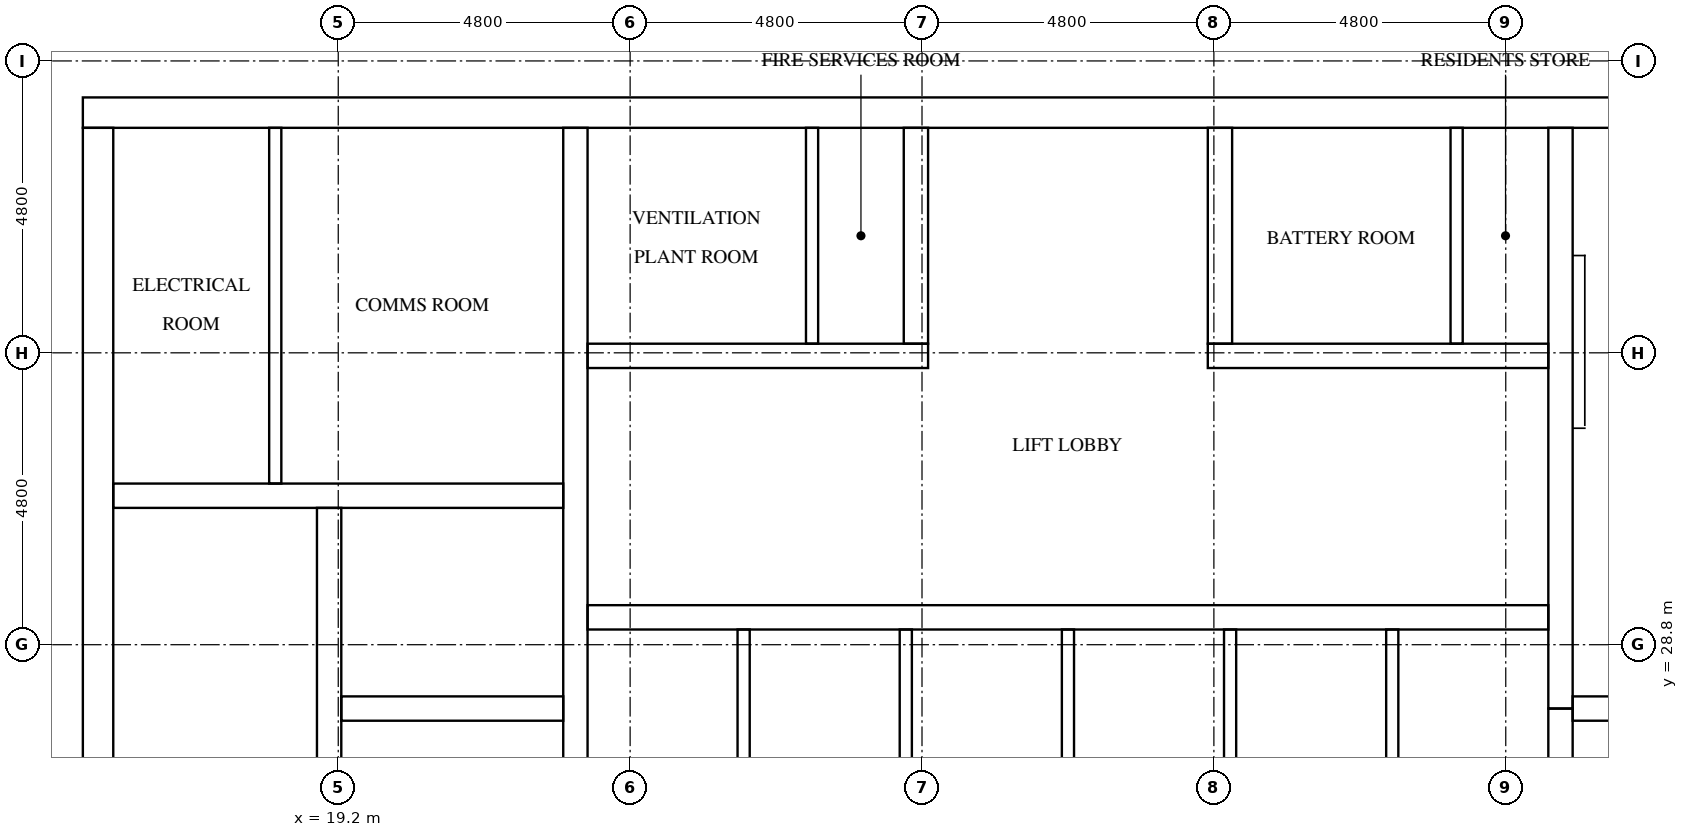
"""IFC4 building model, lengths in metres.
Left out: names, types, materials, properties, quantities, classifications, styles, units other than length and angle.
Written with IfcOpenShell. Run it as: python <this file> out.ifc"""

import sys

from ifc_helpers import new_model, si_unit, direction, frame, frame_2d, origin, place, context, subcontext, project, spatial, rectangle, extrude, element, fill, save


model = new_model("IFC4")
c1 = context("Model", 3, precision=1e-05, world=origin(), true_north=direction((0.0, 1.0)))
c2 = subcontext(c1, "Body", "Model", "MODEL_VIEW")
j1 = project(units=[si_unit("LENGTHUNIT", "METRE"), si_unit("PLANEANGLEUNIT", "RADIAN")], contexts=[c1])
p1 = place(None, origin())
s1 = spatial("IfcSite", under=j1, at=p1, CompositionType="ELEMENT")
p2 = place(p1, origin())
s2 = spatial("IfcBuilding", under=s1, at=p2, CompositionType="ELEMENT")
p3 = place(p2, frame((0.0, 0.0, 272.1)))
s3 = spatial("IfcBuildingStorey", under=s2, at=p3, CompositionType="ELEMENT", Elevation=272.1)
p4 = place(p3, frame((15.0, 37.55, 0.0), z_axis=(0.0, 0.0, 1.0), x_axis=(1.0, 0.0, 0.0)))
e1 = element("IfcWall", 1, at=p4, inside=s3, PredefinedType="SHEAR", context=c2, shape_type="SweptSolid", body=[
    extrude(rectangle(XDim=32.4, YDim=0.5, at=frame_2d((16.2, 0.0))), origin(), (0.0, 0.0, 1.0), 3.2),
])
p5 = place(p4, frame((15.3, 0.0, 0.0)))
e2 = element("IfcOpeningElement", 2, at=p5, cuts=e1, PredefinedType="OPENING", context=c2, shape_type="SweptSolid", body=[
    extrude(rectangle(XDim=1.8, YDim=2.1, at=frame_2d((0.9, 1.05))), frame((0.0, 0.26, 0.0), z_axis=(0.0, -1.0, 0.0), x_axis=(1.0, 0.0, 0.0)), (0.0, 0.0, 1.0), 0.52),
])
p6 = place(p4, frame((1.282, 0.0, 0.0)))
e3 = element("IfcOpeningElement", 3, at=p6, cuts=e1, PredefinedType="OPENING", context=c2, shape_type="SweptSolid", body=[
    extrude(rectangle(XDim=1.0, YDim=2.1, at=frame_2d((0.5, 1.05))), frame((0.0, 0.26, 0.0), z_axis=(0.0, -1.0, 0.0), x_axis=(1.0, 0.0, 0.0)), (0.0, 0.0, 1.0), 0.52),
])
p7 = place(p4, frame((5.082, 0.0, 0.0)))
e4 = element("IfcOpeningElement", 4, at=p7, cuts=e1, PredefinedType="OPENING", context=c2, shape_type="SweptSolid", body=[
    extrude(rectangle(XDim=1.0, YDim=2.1, at=frame_2d((0.5, 1.05))), frame((0.0, 0.26, 0.0), z_axis=(0.0, -1.0, 0.0), x_axis=(1.0, 0.0, 0.0)), (0.0, 0.0, 1.0), 0.52),
])
p8 = place(p3, frame((15.25, 15.5, 0.0), z_axis=(0.0, 0.0, 1.0), x_axis=(0.0, 1.0, 0.0)))
e5 = element("IfcWall", 5, at=p8, inside=s3, PredefinedType="SHEAR", context=c2, shape_type="SweptSolid", body=[
    extrude(rectangle(XDim=21.8, YDim=0.5, at=frame_2d((10.9, 0.0))), origin(), (0.0, 0.0, 1.0), 3.2),
])
p9 = place(p8, frame((5.26, 0.0, 0.0)))
e6 = element("IfcOpeningElement", 6, at=p9, cuts=e5, PredefinedType="OPENING", context=c2, shape_type="SweptSolid", body=[
    extrude(rectangle(XDim=1.2, YDim=2.1, at=frame_2d((0.6, 1.05))), frame((0.0, 0.26, 0.0), z_axis=(0.0, -1.0, 0.0), x_axis=(1.0, 0.0, 0.0)), (0.0, 0.0, 1.0), 0.52),
])
p10 = place(p3, frame((19.05, 15.5, 0.0), z_axis=(0.0, 0.0, 1.0), x_axis=(0.0, 1.0, 0.0)))
e7 = element("IfcWall", 7, at=p10, inside=s3, PredefinedType="SHEAR", context=c2, shape_type="SweptSolid", body=[
    extrude(rectangle(XDim=15.55, YDim=0.4, at=frame_2d((7.775, 0.0))), origin(), (0.0, 0.0, 1.0), 3.2),
])
p11 = place(p10, frame((9.95, 0.0, 0.0)))
e8 = element("IfcOpeningElement", 8, at=p11, cuts=e7, PredefinedType="OPENING", context=c2, shape_type="SweptSolid", body=[
    extrude(rectangle(XDim=1.1, YDim=2.1, at=frame_2d((0.55, 1.05))), frame((0.0, 0.21, 0.0), z_axis=(0.0, -1.0, 0.0), x_axis=(1.0, 0.0, 0.0)), (0.0, 0.0, 1.0), 0.42),
])
p12 = place(p10, frame((13.45, 0.0, 0.0)))
e9 = element("IfcOpeningElement", 9, at=p12, cuts=e7, PredefinedType="OPENING", context=c2, shape_type="SweptSolid", body=[
    extrude(rectangle(XDim=1.1, YDim=2.1, at=frame_2d((0.55, 1.05))), frame((0.0, 0.21, 0.0), z_axis=(0.0, -1.0, 0.0), x_axis=(1.0, 0.0, 0.0)), (0.0, 0.0, 1.0), 0.42),
])
p13 = place(p10, frame((0.7, 0.0, 0.0)))
e10 = element("IfcOpeningElement", 10, at=p13, cuts=e7, PredefinedType="OPENING", context=c2, shape_type="SweptSolid", body=[
    extrude(rectangle(XDim=1.2, YDim=2.1, at=frame_2d((0.6, 1.05))), frame((0.0, 0.21, 0.0), z_axis=(0.0, -1.0, 0.0), x_axis=(1.0, 0.0, 0.0)), (0.0, 0.0, 1.0), 0.42),
])
p14 = place(p3, frame((23.1, 15.5, 0.0), z_axis=(0.0, 0.0, 1.0), x_axis=(0.0, 1.0, 0.0)))
e11 = element("IfcWall", 11, at=p14, inside=s3, PredefinedType="SHEAR", context=c2, shape_type="SweptSolid", body=[
    extrude(rectangle(XDim=21.8, YDim=0.4, at=frame_2d((10.9, 0.0))), origin(), (0.0, 0.0, 1.0), 3.2),
])
p15 = place(p3, frame((39.3, 24.25, 0.0), z_axis=(0.0, 0.0, 1.0), x_axis=(0.0, 1.0, 0.0)))
e12 = element("IfcWall", 12, at=p15, inside=s3, PredefinedType="SHEAR", context=c2, shape_type="SweptSolid", body=[
    extrude(rectangle(XDim=3.5, YDim=0.4, at=frame_2d((1.75, 0.0))), origin(), (0.0, 0.0, 1.0), 3.2),
])
p16 = place(p3, frame((39.3, 27.75, 0.0), z_axis=(0.0, 0.0, 1.0), x_axis=(0.0, 1.0, 0.0)))
e13 = element("IfcWall", 13, at=p16, inside=s3, PredefinedType="SHEAR", context=c2, shape_type="SweptSolid", body=[
    extrude(rectangle(XDim=9.55, YDim=0.4, at=frame_2d((4.775, 0.0))), origin(), (0.0, 0.0, 1.0), 3.2),
])
p17 = place(p3, frame((19.25, 27.75, 0.0), z_axis=(0.0, 0.0, 1.0), x_axis=(1.0, 0.0, 0.0)))
e14 = element("IfcWall", 14, at=p17, inside=s3, PredefinedType="SHEAR", context=c2, shape_type="SweptSolid", body=[
    extrude(rectangle(XDim=3.65, YDim=0.4, at=frame_2d((1.825, 0.0))), origin(), (0.0, 0.0, 1.0), 3.2),
])
p18 = place(p3, frame((15.5, 31.25, 0.0), z_axis=(0.0, 0.0, 1.0), x_axis=(1.0, 0.0, 0.0)))
e15 = element("IfcWall", 15, at=p18, inside=s3, PredefinedType="SHEAR", context=c2, shape_type="SweptSolid", body=[
    extrude(rectangle(XDim=7.4, YDim=0.4, at=frame_2d((3.7, 0.0))), origin(), (0.0, 0.0, 1.0), 3.2),
])
p19 = place(p3, frame((39.5, 27.75, 0.0), z_axis=(0.0, 0.0, 1.0), x_axis=(1.0, 0.0, 0.0)))
e16 = element("IfcWall", 16, at=p19, inside=s3, PredefinedType="SHEAR", context=c2, shape_type="SweptSolid", body=[
    extrude(rectangle(XDim=3.65, YDim=0.4, at=frame_2d((1.825, 0.0))), origin(), (0.0, 0.0, 1.0), 3.2),
])
p20 = place(p3, frame((23.3, 29.25, 0.0), z_axis=(0.0, 0.0, 1.0), x_axis=(1.0, 0.0, 0.0)))
e17 = element("IfcWall", 17, at=p20, inside=s3, PredefinedType="SHEAR", context=c2, shape_type="SweptSolid", body=[
    extrude(rectangle(XDim=15.8, YDim=0.4, at=frame_2d((7.9, 0.0))), origin(), (0.0, 0.0, 1.0), 3.2),
])
p21 = place(p20, frame((0.683, 0.0, 0.0)))
e18 = element("IfcOpeningElement", 18, at=p21, cuts=e17, PredefinedType="OPENING", context=c2, shape_type="SweptSolid", body=[
    extrude(rectangle(XDim=1.1, YDim=2.1, at=frame_2d((0.55, 1.05))), frame((0.0, 0.21, 0.0), z_axis=(0.0, -1.0, 0.0), x_axis=(1.0, 0.0, 0.0)), (0.0, 0.0, 1.0), 0.42),
])
p22 = place(p20, frame((3.35, 0.0, 0.0)))
e19 = element("IfcOpeningElement", 19, at=p22, cuts=e17, PredefinedType="OPENING", context=c2, shape_type="SweptSolid", body=[
    extrude(rectangle(XDim=1.1, YDim=2.1, at=frame_2d((0.55, 1.05))), frame((0.0, 0.21, 0.0), z_axis=(0.0, -1.0, 0.0), x_axis=(1.0, 0.0, 0.0)), (0.0, 0.0, 1.0), 0.42),
])
p23 = place(p20, frame((6.017, 0.0, 0.0)))
e20 = element("IfcOpeningElement", 20, at=p23, cuts=e17, PredefinedType="OPENING", context=c2, shape_type="SweptSolid", body=[
    extrude(rectangle(XDim=1.1, YDim=2.1, at=frame_2d((0.55, 1.05))), frame((0.0, 0.21, 0.0), z_axis=(0.0, -1.0, 0.0), x_axis=(1.0, 0.0, 0.0)), (0.0, 0.0, 1.0), 0.42),
])
p24 = place(p20, frame((8.683, 0.0, 0.0)))
e21 = element("IfcOpeningElement", 21, at=p24, cuts=e17, PredefinedType="OPENING", context=c2, shape_type="SweptSolid", body=[
    extrude(rectangle(XDim=1.1, YDim=2.1, at=frame_2d((0.55, 1.05))), frame((0.0, 0.21, 0.0), z_axis=(0.0, -1.0, 0.0), x_axis=(1.0, 0.0, 0.0)), (0.0, 0.0, 1.0), 0.42),
])
p25 = place(p20, frame((11.35, 0.0, 0.0)))
e22 = element("IfcOpeningElement", 22, at=p25, cuts=e17, PredefinedType="OPENING", context=c2, shape_type="SweptSolid", body=[
    extrude(rectangle(XDim=1.1, YDim=2.1, at=frame_2d((0.55, 1.05))), frame((0.0, 0.21, 0.0), z_axis=(0.0, -1.0, 0.0), x_axis=(1.0, 0.0, 0.0)), (0.0, 0.0, 1.0), 0.42),
])
p26 = place(p20, frame((14.017, 0.0, 0.0)))
e23 = element("IfcOpeningElement", 23, at=p26, cuts=e17, PredefinedType="OPENING", context=c2, shape_type="SweptSolid", body=[
    extrude(rectangle(XDim=1.1, YDim=2.1, at=frame_2d((0.55, 1.05))), frame((0.0, 0.21, 0.0), z_axis=(0.0, -1.0, 0.0), x_axis=(1.0, 0.0, 0.0)), (0.0, 0.0, 1.0), 0.42),
])
p27 = place(p3, frame((23.3, 33.55, 0.0), z_axis=(0.0, 0.0, 1.0), x_axis=(1.0, 0.0, 0.0)))
e24 = element("IfcWall", 24, at=p27, inside=s3, PredefinedType="SHEAR", context=c2, shape_type="SweptSolid", body=[
    extrude(rectangle(XDim=5.6, YDim=0.4, at=frame_2d((2.8, 0.0))), origin(), (0.0, 0.0, 1.0), 3.2),
])
p28 = place(p27, frame((1.296, 0.0, 0.0)))
e25 = element("IfcOpeningElement", 25, at=p28, cuts=e24, PredefinedType="OPENING", context=c2, shape_type="SweptSolid", body=[
    extrude(rectangle(XDim=1.0, YDim=2.1, at=frame_2d((0.5, 1.05))), frame((0.0, 0.21, 0.0), z_axis=(0.0, -1.0, 0.0), x_axis=(1.0, 0.0, 0.0)), (0.0, 0.0, 1.0), 0.42),
])
p29 = place(p27, frame((3.996, 0.0, 0.0)))
e26 = element("IfcOpeningElement", 26, at=p29, cuts=e24, PredefinedType="OPENING", context=c2, shape_type="SweptSolid", body=[
    extrude(rectangle(XDim=1.0, YDim=2.1, at=frame_2d((0.5, 1.05))), frame((0.0, 0.21, 0.0), z_axis=(0.0, -1.0, 0.0), x_axis=(1.0, 0.0, 0.0)), (0.0, 0.0, 1.0), 0.42),
])
p30 = place(p3, frame((33.5, 33.55, 0.0), z_axis=(0.0, 0.0, 1.0), x_axis=(1.0, 0.0, 0.0)))
e27 = element("IfcWall", 27, at=p30, inside=s3, PredefinedType="SHEAR", context=c2, shape_type="SweptSolid", body=[
    extrude(rectangle(XDim=5.6, YDim=0.4, at=frame_2d((2.8, 0.0))), origin(), (0.0, 0.0, 1.0), 3.2),
])
p31 = place(p30, frame((1.696, 0.0, 0.0)))
e28 = element("IfcOpeningElement", 28, at=p31, cuts=e27, PredefinedType="OPENING", context=c2, shape_type="SweptSolid", body=[
    extrude(rectangle(XDim=1.0, YDim=2.1, at=frame_2d((0.5, 1.05))), frame((0.0, 0.21, 0.0), z_axis=(0.0, -1.0, 0.0), x_axis=(1.0, 0.0, 0.0)), (0.0, 0.0, 1.0), 0.42),
])
p32 = place(p30, frame((4.396, 0.0, 0.0)))
e29 = element("IfcOpeningElement", 29, at=p32, cuts=e27, PredefinedType="OPENING", context=c2, shape_type="SweptSolid", body=[
    extrude(rectangle(XDim=1.0, YDim=2.1, at=frame_2d((0.5, 1.05))), frame((0.0, 0.21, 0.0), z_axis=(0.0, -1.0, 0.0), x_axis=(1.0, 0.0, 0.0)), (0.0, 0.0, 1.0), 0.42),
])
for number, where, z_axis, x_axis in (
    (30, (28.7, 33.75, 0.0), (0.0, 0.0, 1.0), (0.0, 1.0, 0.0)),
    (31, (33.7, 33.75, 0.0), (0.0, 0.0, 1.0), (0.0, 1.0, 0.0)),
):
    element("IfcWall", number, at=place(p3, frame(where, z_axis=z_axis, x_axis=x_axis)), inside=s3, PredefinedType="SHEAR", context=c2, shape_type="SweptSolid", body=[
        extrude(rectangle(XDim=3.55, YDim=0.4, at=frame_2d((1.775, 0.0))), origin(), (0.0, 0.0, 1.0), 3.2),
    ])
for number, where, z_axis, x_axis in (
    (32, (25.867, 26.35, 0.0), (0.0, 0.0, 1.0), (0.0, 1.0, 0.0)),
    (33, (28.533, 26.35, 0.0), (0.0, 0.0, 1.0), (0.0, 1.0, 0.0)),
    (34, (31.2, 26.35, 0.0), (0.0, 0.0, 1.0), (0.0, 1.0, 0.0)),
    (35, (33.867, 26.35, 0.0), (0.0, 0.0, 1.0), (0.0, 1.0, 0.0)),
    (36, (36.533, 26.35, 0.0), (0.0, 0.0, 1.0), (0.0, 1.0, 0.0)),
):
    element("IfcWall", number, at=place(p3, frame(where, z_axis=z_axis, x_axis=x_axis)), inside=s3, PredefinedType="SOLIDWALL", context=c2, shape_type="SweptSolid", body=[
        extrude(rectangle(XDim=2.7, YDim=0.2, at=frame_2d((1.35, 0.0))), origin(), (0.0, 0.0, 1.0), 3.2),
    ])
p33 = place(p3, frame((18.164, 31.45, 0.0), z_axis=(0.0, 0.0, 1.0), x_axis=(0.0, 1.0, 0.0)))
e37 = element("IfcWall", 37, at=p33, inside=s3, PredefinedType="PARTITIONING", context=c2, shape_type="SweptSolid", body=[
    extrude(rectangle(XDim=5.85, YDim=0.2, at=frame_2d((2.925, 0.0))), origin(), (0.0, 0.0, 1.0), 3.2),
])
for number, where, z_axis, x_axis in (
    (38, (26.992, 33.75, 0.0), (0.0, 0.0, 1.0), (0.0, 1.0, 0.0)),
    (39, (37.592, 33.75, 0.0), (0.0, 0.0, 1.0), (0.0, 1.0, 0.0)),
):
    element("IfcWall", number, at=place(p3, frame(where, z_axis=z_axis, x_axis=x_axis)), inside=s3, PredefinedType="PARTITIONING", context=c2, shape_type="SweptSolid", body=[
        extrude(rectangle(XDim=3.55, YDim=0.2, at=frame_2d((1.775, 0.0))), origin(), (0.0, 0.0, 1.0), 3.2),
    ])
p34 = place(p21, origin())
e40 = element("IfcDoor", 40, at=p34, inside=s3, OperationType="DOUBLE_DOOR_SLIDING", PredefinedType="DOOR", context=c2, shape_type="SweptSolid", body=[
    extrude(rectangle(XDim=1.1, YDim=2.1, at=frame_2d((0.55, 1.05))), frame((0.0, 0.025, 0.0), z_axis=(0.0, -1.0, 0.0), x_axis=(1.0, 0.0, 0.0)), (0.0, 0.0, 1.0), 0.05),
])
fill(e18, e40)
p35 = place(p22, origin())
e41 = element("IfcDoor", 41, at=p35, inside=s3, OperationType="DOUBLE_DOOR_SLIDING", PredefinedType="DOOR", context=c2, shape_type="SweptSolid", body=[
    extrude(rectangle(XDim=1.1, YDim=2.1, at=frame_2d((0.55, 1.05))), frame((0.0, 0.025, 0.0), z_axis=(0.0, -1.0, 0.0), x_axis=(1.0, 0.0, 0.0)), (0.0, 0.0, 1.0), 0.05),
])
fill(e19, e41)
p36 = place(p23, origin())
e42 = element("IfcDoor", 42, at=p36, inside=s3, OperationType="DOUBLE_DOOR_SLIDING", PredefinedType="DOOR", context=c2, shape_type="SweptSolid", body=[
    extrude(rectangle(XDim=1.1, YDim=2.1, at=frame_2d((0.55, 1.05))), frame((0.0, 0.025, 0.0), z_axis=(0.0, -1.0, 0.0), x_axis=(1.0, 0.0, 0.0)), (0.0, 0.0, 1.0), 0.05),
])
fill(e20, e42)
p37 = place(p24, origin())
e43 = element("IfcDoor", 43, at=p37, inside=s3, OperationType="DOUBLE_DOOR_SLIDING", PredefinedType="DOOR", context=c2, shape_type="SweptSolid", body=[
    extrude(rectangle(XDim=1.1, YDim=2.1, at=frame_2d((0.55, 1.05))), frame((0.0, 0.025, 0.0), z_axis=(0.0, -1.0, 0.0), x_axis=(1.0, 0.0, 0.0)), (0.0, 0.0, 1.0), 0.05),
])
fill(e21, e43)
p38 = place(p25, origin())
e44 = element("IfcDoor", 44, at=p38, inside=s3, OperationType="DOUBLE_DOOR_SLIDING", PredefinedType="DOOR", context=c2, shape_type="SweptSolid", body=[
    extrude(rectangle(XDim=1.1, YDim=2.1, at=frame_2d((0.55, 1.05))), frame((0.0, 0.025, 0.0), z_axis=(0.0, -1.0, 0.0), x_axis=(1.0, 0.0, 0.0)), (0.0, 0.0, 1.0), 0.05),
])
fill(e22, e44)
p39 = place(p26, origin())
e45 = element("IfcDoor", 45, at=p39, inside=s3, OperationType="DOUBLE_DOOR_SLIDING", PredefinedType="DOOR", context=c2, shape_type="SweptSolid", body=[
    extrude(rectangle(XDim=1.1, YDim=2.1, at=frame_2d((0.55, 1.05))), frame((0.0, 0.025, 0.0), z_axis=(0.0, -1.0, 0.0), x_axis=(1.0, 0.0, 0.0)), (0.0, 0.0, 1.0), 0.05),
])
fill(e23, e45)
p40 = place(p12, origin())
e46 = element("IfcDoor", 46, at=p40, inside=s3, OperationType="DOUBLE_DOOR_SLIDING", PredefinedType="DOOR", context=c2, shape_type="SweptSolid", body=[
    extrude(rectangle(XDim=1.1, YDim=2.1, at=frame_2d((0.55, 1.05))), frame((0.0, 0.025, 0.0), z_axis=(0.0, -1.0, 0.0), x_axis=(1.0, 0.0, 0.0)), (0.0, 0.0, 1.0), 0.05),
])
fill(e9, e46)
p41 = place(p5, origin())
e47 = element("IfcDoor", 47, at=p41, inside=s3, OperationType="DOUBLE_DOOR_SINGLE_SWING", PredefinedType="DOOR", context=c2, shape_type="SweptSolid", body=[
    extrude(rectangle(XDim=1.8, YDim=2.1, at=frame_2d((0.9, 1.05))), frame((0.0, 0.025, 0.0), z_axis=(0.0, -1.0, 0.0), x_axis=(1.0, 0.0, 0.0)), (0.0, 0.0, 1.0), 0.05),
])
fill(e2, e47)
p42 = place(p6, origin())
e48 = element("IfcDoor", 48, at=p42, inside=s3, OperationType="SINGLE_SWING_RIGHT", PredefinedType="DOOR", context=c2, shape_type="SweptSolid", body=[
    extrude(rectangle(XDim=1.0, YDim=2.1, at=frame_2d((0.5, 1.05))), frame((0.0, 0.025, 0.0), z_axis=(0.0, -1.0, 0.0), x_axis=(1.0, 0.0, 0.0)), (0.0, 0.0, 1.0), 0.05),
])
fill(e3, e48)
p43 = place(p7, origin())
e49 = element("IfcDoor", 49, at=p43, inside=s3, OperationType="SINGLE_SWING_LEFT", PredefinedType="DOOR", context=c2, shape_type="SweptSolid", body=[
    extrude(rectangle(XDim=1.0, YDim=2.1, at=frame_2d((0.5, 1.05))), frame((0.0, 0.025, 0.0), z_axis=(0.0, -1.0, 0.0), x_axis=(1.0, 0.0, 0.0)), (0.0, 0.0, 1.0), 0.05),
])
fill(e4, e49)
p44 = place(p28, frame((1.0, 0.0, 0.0), z_axis=(0.0, 0.0, 1.0), x_axis=(-1.0, 0.0, 0.0)))
e50 = element("IfcDoor", 50, at=p44, inside=s3, OperationType="SINGLE_SWING_LEFT", PredefinedType="DOOR", context=c2, shape_type="SweptSolid", body=[
    extrude(rectangle(XDim=1.0, YDim=2.1, at=frame_2d((0.5, 1.05))), frame((0.0, 0.025, 0.0), z_axis=(0.0, -1.0, 0.0), x_axis=(1.0, 0.0, 0.0)), (0.0, 0.0, 1.0), 0.05),
])
fill(e25, e50)
p45 = place(p29, frame((1.0, 0.0, 0.0), z_axis=(0.0, 0.0, 1.0), x_axis=(-1.0, 0.0, 0.0)))
e51 = element("IfcDoor", 51, at=p45, inside=s3, OperationType="SINGLE_SWING_RIGHT", PredefinedType="DOOR", context=c2, shape_type="SweptSolid", body=[
    extrude(rectangle(XDim=1.0, YDim=2.1, at=frame_2d((0.5, 1.05))), frame((0.0, 0.025, 0.0), z_axis=(0.0, -1.0, 0.0), x_axis=(1.0, 0.0, 0.0)), (0.0, 0.0, 1.0), 0.05),
])
fill(e26, e51)
p46 = place(p31, frame((1.0, 0.0, 0.0), z_axis=(0.0, 0.0, 1.0), x_axis=(-1.0, 0.0, 0.0)))
e52 = element("IfcDoor", 52, at=p46, inside=s3, OperationType="SINGLE_SWING_LEFT", PredefinedType="DOOR", context=c2, shape_type="SweptSolid", body=[
    extrude(rectangle(XDim=1.0, YDim=2.1, at=frame_2d((0.5, 1.05))), frame((0.0, 0.025, 0.0), z_axis=(0.0, -1.0, 0.0), x_axis=(1.0, 0.0, 0.0)), (0.0, 0.0, 1.0), 0.05),
])
fill(e28, e52)
p47 = place(p32, frame((1.0, 0.0, 0.0), z_axis=(0.0, 0.0, 1.0), x_axis=(-1.0, 0.0, 0.0)))
e53 = element("IfcDoor", 53, at=p47, inside=s3, OperationType="SINGLE_SWING_RIGHT", PredefinedType="DOOR", context=c2, shape_type="SweptSolid", body=[
    extrude(rectangle(XDim=1.0, YDim=2.1, at=frame_2d((0.5, 1.05))), frame((0.0, 0.025, 0.0), z_axis=(0.0, -1.0, 0.0), x_axis=(1.0, 0.0, 0.0)), (0.0, 0.0, 1.0), 0.05),
])
fill(e29, e53)
save(model, sys.argv[1])
